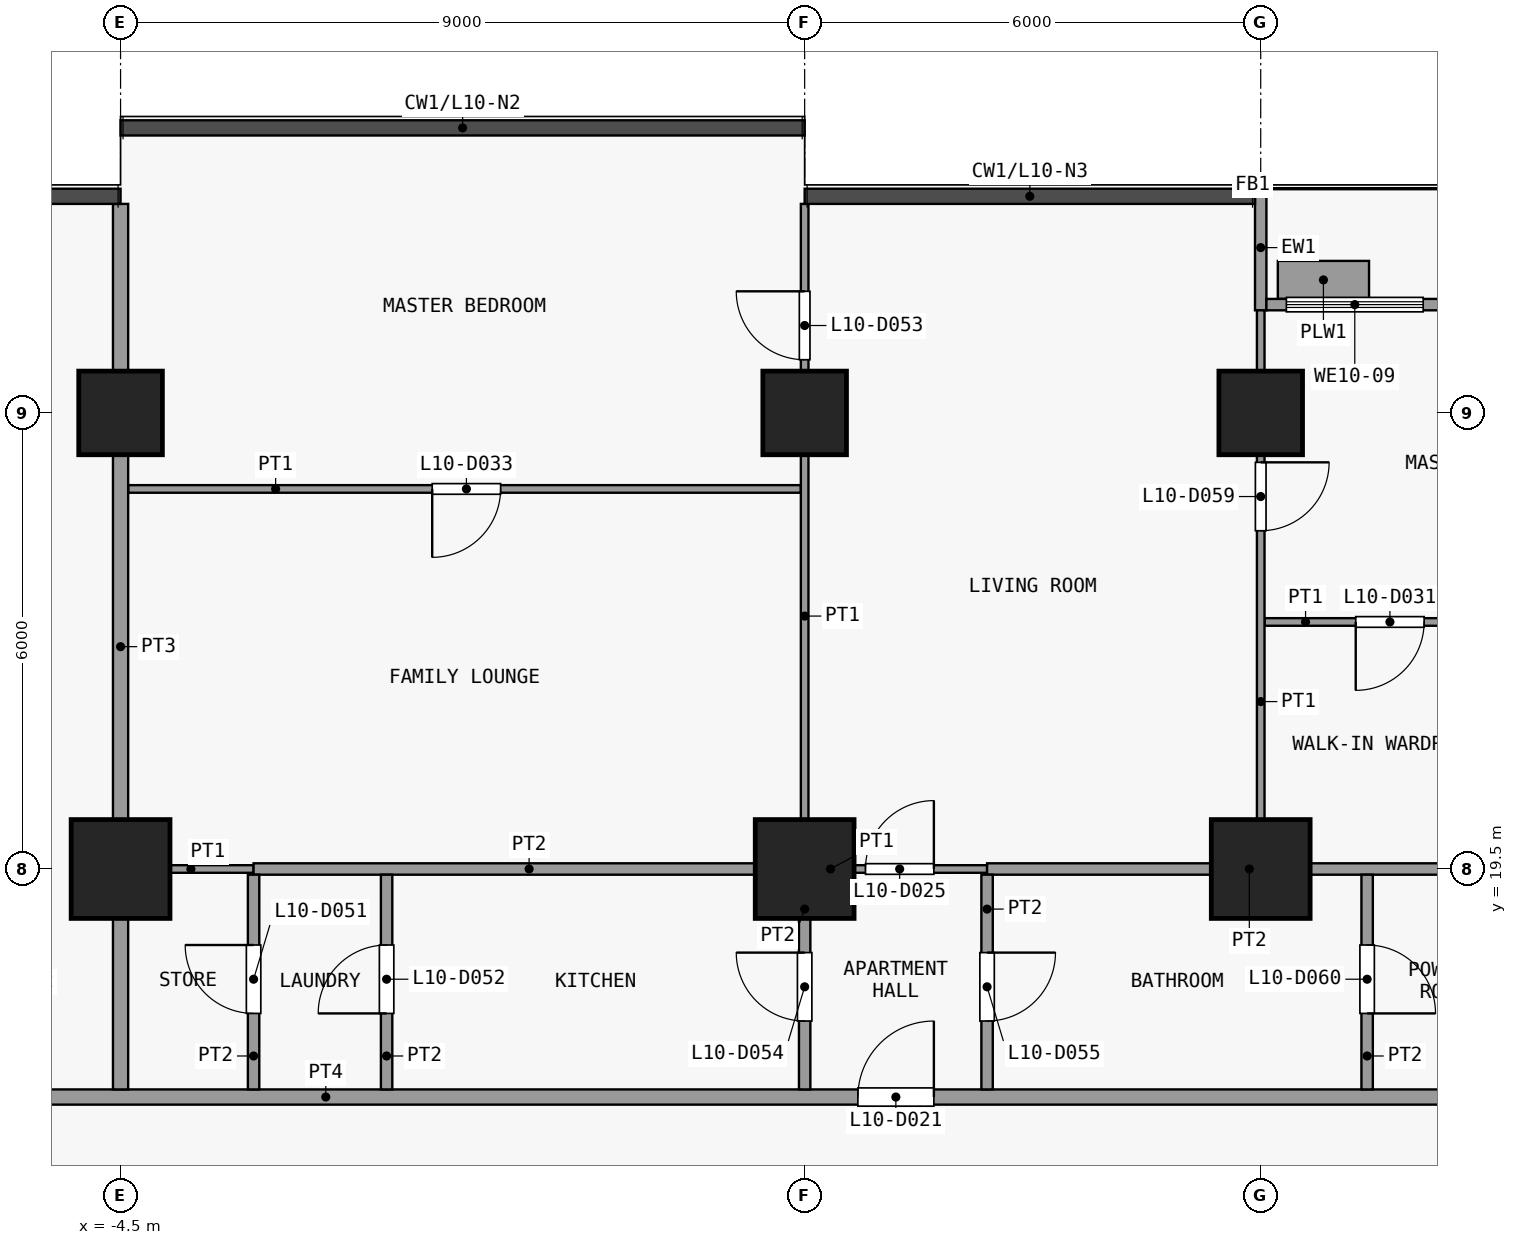
"""IFC4 building model, lengths in metres.
Left out: names, types, materials, properties, quantities, classifications, styles, units other than length and angle.
Written with IfcOpenShell. Run it as: python <this file> out.ifc"""

import sys

from ifc_helpers import new_model, si_unit, direction, frame, frame_2d, origin, origin_2d, place, context, subcontext, project, spatial, rectangle, extrude, element, fill, save


model = new_model("IFC4")
c1 = context("Model", 3, precision=1e-05, world=origin(), true_north=direction((0.0, 1.0)))
c2 = subcontext(c1, "Body", "Model", "MODEL_VIEW")
j1 = project(units=[si_unit("LENGTHUNIT", "METRE"), si_unit("PLANEANGLEUNIT", "RADIAN")], contexts=[c1])
p1 = place(None, origin())
s1 = spatial("IfcSite", under=j1, at=p1, CompositionType="ELEMENT")
p2 = place(p1, origin())
s2 = spatial("IfcBuilding", under=s1, at=p2, CompositionType="ELEMENT")
p3 = place(p2, frame((0.0, 0.0, 46.9)))
s3 = spatial("IfcBuildingStorey", under=s2, at=p3, CompositionType="ELEMENT", Elevation=46.9)
p4 = place(p3, frame((-4.5, 19.5, 0.0), z_axis=(0.0, 0.0, 1.0), x_axis=(1.0, 0.0, 0.0)))
e1 = element("IfcColumn", 1, at=p4, inside=s3, PredefinedType="COLUMN", context=c2, shape_type="SweptSolid", body=[
    extrude(rectangle(XDim=1.3, YDim=1.3, at=origin_2d()), origin(), (0.0, 0.0, 1.0), 3.6),
])
p5 = place(p3, frame((-4.5, 25.5, 0.0), z_axis=(0.0, 0.0, 1.0), x_axis=(1.0, 0.0, 0.0)))
e2 = element("IfcColumn", 2, at=p5, inside=s3, PredefinedType="COLUMN", context=c2, shape_type="SweptSolid", body=[
    extrude(rectangle(XDim=1.1, YDim=1.1, at=origin_2d()), origin(), (0.0, 0.0, 1.0), 3.6),
])
p6 = place(p3, frame((4.5, 19.5, 0.0), z_axis=(0.0, 0.0, 1.0), x_axis=(1.0, 0.0, 0.0)))
e3 = element("IfcColumn", 3, at=p6, inside=s3, PredefinedType="COLUMN", context=c2, shape_type="SweptSolid", body=[
    extrude(rectangle(XDim=1.3, YDim=1.3, at=origin_2d()), origin(), (0.0, 0.0, 1.0), 3.6),
])
p7 = place(p3, frame((4.5, 25.5, 0.0), z_axis=(0.0, 0.0, 1.0), x_axis=(1.0, 0.0, 0.0)))
e4 = element("IfcColumn", 4, at=p7, inside=s3, PredefinedType="COLUMN", context=c2, shape_type="SweptSolid", body=[
    extrude(rectangle(XDim=1.1, YDim=1.1, at=origin_2d()), origin(), (0.0, 0.0, 1.0), 3.6),
])
p8 = place(p3, frame((10.5, 19.5, 0.0), z_axis=(0.0, 0.0, 1.0), x_axis=(1.0, 0.0, 0.0)))
e5 = element("IfcColumn", 5, at=p8, inside=s3, PredefinedType="COLUMN", context=c2, shape_type="SweptSolid", body=[
    extrude(rectangle(XDim=1.3, YDim=1.3, at=origin_2d()), origin(), (0.0, 0.0, 1.0), 3.6),
])
p9 = place(p3, frame((10.5, 25.5, 0.0), z_axis=(0.0, 0.0, 1.0), x_axis=(1.0, 0.0, 0.0)))
e6 = element("IfcColumn", 6, at=p9, inside=s3, PredefinedType="COLUMN", context=c2, shape_type="SweptSolid", body=[
    extrude(rectangle(XDim=1.1, YDim=1.1, at=origin_2d()), origin(), (0.0, 0.0, 1.0), 3.6),
])
p10 = place(p3, frame((10.5, 26.85, 0.0), z_axis=(0.0, 0.0, 1.0), x_axis=(0.0, 1.0, 0.0)))
e7 = element("IfcWall", 7, at=p10, inside=s3, PredefinedType="SOLIDWALL", context=c2, shape_type="SweptSolid", body=[
    extrude(rectangle(XDim=1.65, YDim=0.15, at=frame_2d((0.825, 0.0))), origin(), (0.0, 0.0, 1.0), 3.3),
])
p11 = place(p3, frame((10.575, 26.925, 0.0), z_axis=(0.0, 0.0, 1.0), x_axis=(1.0, 0.0, 0.0)))
e8 = element("IfcWall", 8, at=p11, inside=s3, PredefinedType="SOLIDWALL", context=c2, shape_type="SweptSolid", body=[
    extrude(rectangle(XDim=5.85, YDim=0.15, at=frame_2d((2.925, 0.0))), origin(), (0.0, 0.0, 1.0), 3.3),
])
p12 = place(p11, frame((2.325, 0.0, 0.0)))
e9 = element("IfcOpeningElement", 9, at=p12, cuts=e8, PredefinedType="OPENING", context=c2, shape_type="SweptSolid", body=[
    extrude(rectangle(XDim=1.2, YDim=2.4, at=frame_2d((0.6, 1.2))), frame((0.0, 0.085, 0.0), z_axis=(0.0, -1.0, 0.0), x_axis=(1.0, 0.0, 0.0)), (0.0, 0.0, 1.0), 0.17),
])
p13 = place(p11, frame((0.262, 0.0, 0.9)))
e10 = element("IfcOpeningElement", 10, at=p13, cuts=e8, PredefinedType="OPENING", context=c2, shape_type="SweptSolid", body=[
    extrude(rectangle(XDim=1.8, YDim=2.1, at=frame_2d((0.9, 1.05))), frame((0.0, 0.085, 0.0), z_axis=(0.0, -1.0, 0.0), x_axis=(1.0, 0.0, 0.0)), (0.0, 0.0, 1.0), 0.17),
])
p14 = place(p11, frame((3.788, 0.0, 0.9)))
e11 = element("IfcOpeningElement", 11, at=p14, cuts=e8, PredefinedType="OPENING", context=c2, shape_type="SweptSolid", body=[
    extrude(rectangle(XDim=1.8, YDim=2.1, at=frame_2d((0.9, 1.05))), frame((0.0, 0.085, 0.0), z_axis=(0.0, -1.0, 0.0), x_axis=(1.0, 0.0, 0.0)), (0.0, 0.0, 1.0), 0.17),
])
p15 = place(p3, frame((10.725, 27.25, 0.0), z_axis=(0.0, 0.0, 1.0), x_axis=(1.0, 0.0, 0.0)))
e12 = element("IfcWall", 12, at=p15, inside=s3, PredefinedType="USERDEFINED", context=c2, shape_type="SweptSolid", body=[
    extrude(rectangle(XDim=1.2, YDim=0.5, at=frame_2d((0.6, 0.0))), origin(), (0.0, 0.0, 1.0), 0.9),
])
p16 = place(p3, frame((-25.35, 16.5, 0.0), z_axis=(0.0, 0.0, 1.0), x_axis=(1.0, 0.0, 0.0)))
e13 = element("IfcWall", 13, at=p16, inside=s3, PredefinedType="PARTITIONING", context=c2, shape_type="SweptSolid", body=[
    extrude(rectangle(XDim=50.7, YDim=0.2, at=frame_2d((25.35, 0.0))), origin(), (0.0, 0.0, 1.0), 3.3),
])
p17 = place(p16, frame((7.05, 0.0, 0.0)))
e14 = element("IfcOpeningElement", 14, at=p17, cuts=e13, PredefinedType="OPENING", context=c2, shape_type="SweptSolid", body=[
    extrude(rectangle(XDim=1.0, YDim=2.1, at=frame_2d((0.5, 1.05))), frame((0.0, 0.11, 0.0), z_axis=(0.0, -1.0, 0.0), x_axis=(1.0, 0.0, 0.0)), (0.0, 0.0, 1.0), 0.22),
])
p18 = place(p16, frame((15.55, 0.0, 0.0)))
e15 = element("IfcOpeningElement", 15, at=p18, cuts=e13, PredefinedType="OPENING", context=c2, shape_type="SweptSolid", body=[
    extrude(rectangle(XDim=1.0, YDim=2.1, at=frame_2d((0.5, 1.05))), frame((0.0, 0.11, 0.0), z_axis=(0.0, -1.0, 0.0), x_axis=(1.0, 0.0, 0.0)), (0.0, 0.0, 1.0), 0.22),
])
p19 = place(p16, frame((30.55, 0.0, 0.0)))
e16 = element("IfcOpeningElement", 16, at=p19, cuts=e13, PredefinedType="OPENING", context=c2, shape_type="SweptSolid", body=[
    extrude(rectangle(XDim=1.0, YDim=2.1, at=frame_2d((0.5, 1.05))), frame((0.0, 0.11, 0.0), z_axis=(0.0, -1.0, 0.0), x_axis=(1.0, 0.0, 0.0)), (0.0, 0.0, 1.0), 0.22),
])
p20 = place(p16, frame((45.05, 0.0, 0.0)))
e17 = element("IfcOpeningElement", 17, at=p20, cuts=e13, PredefinedType="OPENING", context=c2, shape_type="SweptSolid", body=[
    extrude(rectangle(XDim=1.0, YDim=2.1, at=frame_2d((0.5, 1.05))), frame((0.0, 0.11, 0.0), z_axis=(0.0, -1.0, 0.0), x_axis=(1.0, 0.0, 0.0)), (0.0, 0.0, 1.0), 0.22),
])
p21 = place(p3, frame((-4.4, 19.5, 0.0), z_axis=(0.0, 0.0, 1.0), x_axis=(1.0, 0.0, 0.0)))
e18 = element("IfcWall", 18, at=p21, inside=s3, PredefinedType="PARTITIONING", context=c2, shape_type="SweptSolid", body=[
    extrude(rectangle(XDim=1.65, YDim=0.1, at=frame_2d((0.825, 0.0))), origin(), (0.0, 0.0, 1.0), 3.3),
])
p22 = place(p3, frame((4.5, 19.5, 0.0), z_axis=(0.0, 0.0, 1.0), x_axis=(1.0, 0.0, 0.0)))
e19 = element("IfcWall", 19, at=p22, inside=s3, PredefinedType="PARTITIONING", context=c2, shape_type="SweptSolid", body=[
    extrude(rectangle(XDim=2.4, YDim=0.1, at=frame_2d((1.2, 0.0))), origin(), (0.0, 0.0, 1.0), 3.3),
])
p23 = place(p22, frame((0.8, 0.0, 0.0)))
e20 = element("IfcOpeningElement", 20, at=p23, cuts=e19, PredefinedType="OPENING", context=c2, shape_type="SweptSolid", body=[
    extrude(rectangle(XDim=0.9, YDim=2.1, at=frame_2d((0.45, 1.05))), frame((0.0, 0.06, 0.0), z_axis=(0.0, -1.0, 0.0), x_axis=(1.0, 0.0, 0.0)), (0.0, 0.0, 1.0), 0.12),
])
p24 = place(p3, frame((-2.75, 19.5, 0.0), z_axis=(0.0, 0.0, 1.0), x_axis=(1.0, 0.0, 0.0)))
e21 = element("IfcWall", 21, at=p24, inside=s3, PredefinedType="PARTITIONING", context=c2, shape_type="SweptSolid", body=[
    extrude(rectangle(XDim=7.25, YDim=0.15, at=frame_2d((3.625, 0.0))), origin(), (0.0, 0.0, 1.0), 3.3),
])
p25 = place(p3, frame((6.9, 19.5, 0.0), z_axis=(0.0, 0.0, 1.0), x_axis=(1.0, 0.0, 0.0)))
e22 = element("IfcWall", 22, at=p25, inside=s3, PredefinedType="PARTITIONING", context=c2, shape_type="SweptSolid", body=[
    extrude(rectangle(XDim=6.9, YDim=0.15, at=frame_2d((3.45, 0.0))), origin(), (0.0, 0.0, 1.0), 3.3),
])
p26 = place(p3, frame((10.55, 22.75, 0.0), z_axis=(0.0, 0.0, 1.0), x_axis=(1.0, 0.0, 0.0)))
e23 = element("IfcWall", 23, at=p26, inside=s3, PredefinedType="PARTITIONING", context=c2, shape_type="SweptSolid", body=[
    extrude(rectangle(XDim=3.25, YDim=0.1, at=frame_2d((1.625, 0.0))), origin(), (0.0, 0.0, 1.0), 3.3),
])
p27 = place(p26, frame((1.2, 0.0, 0.0)))
e24 = element("IfcOpeningElement", 24, at=p27, cuts=e23, PredefinedType="OPENING", context=c2, shape_type="SweptSolid", body=[
    extrude(rectangle(XDim=0.9, YDim=2.1, at=frame_2d((0.45, 1.05))), frame((0.0, 0.06, 0.0), z_axis=(0.0, -1.0, 0.0), x_axis=(1.0, 0.0, 0.0)), (0.0, 0.0, 1.0), 0.12),
])
p28 = place(p3, frame((-4.4, 24.5, 0.0), z_axis=(0.0, 0.0, 1.0), x_axis=(1.0, 0.0, 0.0)))
e25 = element("IfcWall", 25, at=p28, inside=s3, PredefinedType="PARTITIONING", context=c2, shape_type="SweptSolid", body=[
    extrude(rectangle(XDim=8.85, YDim=0.1, at=frame_2d((4.425, 0.0))), origin(), (0.0, 0.0, 1.0), 3.3),
])
p29 = place(p28, frame((4.0, 0.0, 0.0)))
e26 = element("IfcOpeningElement", 26, at=p29, cuts=e25, PredefinedType="OPENING", context=c2, shape_type="SweptSolid", body=[
    extrude(rectangle(XDim=0.9, YDim=2.1, at=frame_2d((0.45, 1.05))), frame((0.0, 0.06, 0.0), z_axis=(0.0, -1.0, 0.0), x_axis=(1.0, 0.0, 0.0)), (0.0, 0.0, 1.0), 0.12),
])
p30 = place(p3, frame((-4.5, 16.6, 0.0), z_axis=(0.0, 0.0, 1.0), x_axis=(0.0, 1.0, 0.0)))
e27 = element("IfcWall", 27, at=p30, inside=s3, PredefinedType="PARTITIONING", context=c2, shape_type="SweptSolid", body=[
    extrude(rectangle(XDim=11.65, YDim=0.2, at=frame_2d((5.825, 0.0))), origin(), (0.0, 0.0, 1.0), 3.3),
])
p31 = place(p3, frame((-2.75, 16.6, 0.0), z_axis=(0.0, 0.0, 1.0), x_axis=(0.0, 1.0, 0.0)))
e28 = element("IfcWall", 28, at=p31, inside=s3, PredefinedType="PARTITIONING", context=c2, shape_type="SweptSolid", body=[
    extrude(rectangle(XDim=2.825, YDim=0.15, at=frame_2d((1.413, 0.0))), origin(), (0.0, 0.0, 1.0), 3.3),
])
p32 = place(p31, frame((1.0, 0.0, 0.0)))
e29 = element("IfcOpeningElement", 29, at=p32, cuts=e28, PredefinedType="OPENING", context=c2, shape_type="SweptSolid", body=[
    extrude(rectangle(XDim=0.9, YDim=2.1, at=frame_2d((0.45, 1.05))), frame((0.0, 0.085, 0.0), z_axis=(0.0, -1.0, 0.0), x_axis=(1.0, 0.0, 0.0)), (0.0, 0.0, 1.0), 0.17),
])
p33 = place(p3, frame((-1.0, 16.6, 0.0), z_axis=(0.0, 0.0, 1.0), x_axis=(0.0, 1.0, 0.0)))
e30 = element("IfcWall", 30, at=p33, inside=s3, PredefinedType="PARTITIONING", context=c2, shape_type="SweptSolid", body=[
    extrude(rectangle(XDim=2.825, YDim=0.15, at=frame_2d((1.413, 0.0))), origin(), (0.0, 0.0, 1.0), 3.3),
])
p34 = place(p33, frame((1.0, 0.0, 0.0)))
e31 = element("IfcOpeningElement", 31, at=p34, cuts=e30, PredefinedType="OPENING", context=c2, shape_type="SweptSolid", body=[
    extrude(rectangle(XDim=0.9, YDim=2.1, at=frame_2d((0.45, 1.05))), frame((0.0, 0.085, 0.0), z_axis=(0.0, -1.0, 0.0), x_axis=(1.0, 0.0, 0.0)), (0.0, 0.0, 1.0), 0.17),
])
p35 = place(p3, frame((4.5, 19.575, 0.0), z_axis=(0.0, 0.0, 1.0), x_axis=(0.0, 1.0, 0.0)))
e32 = element("IfcWall", 32, at=p35, inside=s3, PredefinedType="PARTITIONING", context=c2, shape_type="SweptSolid", body=[
    extrude(rectangle(XDim=8.675, YDim=0.1, at=frame_2d((4.337, 0.0))), origin(), (0.0, 0.0, 1.0), 3.3),
])
p36 = place(p35, frame((6.625, 0.0, 0.0)))
e33 = element("IfcOpeningElement", 33, at=p36, cuts=e32, PredefinedType="OPENING", context=c2, shape_type="SweptSolid", body=[
    extrude(rectangle(XDim=0.9, YDim=2.1, at=frame_2d((0.45, 1.05))), frame((0.0, 0.06, 0.0), z_axis=(0.0, -1.0, 0.0), x_axis=(1.0, 0.0, 0.0)), (0.0, 0.0, 1.0), 0.12),
])
p37 = place(p3, frame((4.5, 16.6, 0.0), z_axis=(0.0, 0.0, 1.0), x_axis=(0.0, 1.0, 0.0)))
e34 = element("IfcWall", 34, at=p37, inside=s3, PredefinedType="PARTITIONING", context=c2, shape_type="SweptSolid", body=[
    extrude(rectangle(XDim=2.825, YDim=0.15, at=frame_2d((1.413, 0.0))), origin(), (0.0, 0.0, 1.0), 3.3),
])
p38 = place(p37, frame((0.9, 0.0, 0.0)))
e35 = element("IfcOpeningElement", 35, at=p38, cuts=e34, PredefinedType="OPENING", context=c2, shape_type="SweptSolid", body=[
    extrude(rectangle(XDim=0.9, YDim=2.1, at=frame_2d((0.45, 1.05))), frame((0.0, 0.085, 0.0), z_axis=(0.0, -1.0, 0.0), x_axis=(1.0, 0.0, 0.0)), (0.0, 0.0, 1.0), 0.17),
])
p39 = place(p3, frame((6.9, 16.6, 0.0), z_axis=(0.0, 0.0, 1.0), x_axis=(0.0, 1.0, 0.0)))
e36 = element("IfcWall", 36, at=p39, inside=s3, PredefinedType="PARTITIONING", context=c2, shape_type="SweptSolid", body=[
    extrude(rectangle(XDim=2.825, YDim=0.15, at=frame_2d((1.413, 0.0))), origin(), (0.0, 0.0, 1.0), 3.3),
])
p40 = place(p39, frame((0.9, 0.0, 0.0)))
e37 = element("IfcOpeningElement", 37, at=p40, cuts=e36, PredefinedType="OPENING", context=c2, shape_type="SweptSolid", body=[
    extrude(rectangle(XDim=0.9, YDim=2.1, at=frame_2d((0.45, 1.05))), frame((0.0, 0.085, 0.0), z_axis=(0.0, -1.0, 0.0), x_axis=(1.0, 0.0, 0.0)), (0.0, 0.0, 1.0), 0.17),
])
p41 = place(p3, frame((10.5, 19.575, 0.0), z_axis=(0.0, 0.0, 1.0), x_axis=(0.0, 1.0, 0.0)))
e38 = element("IfcWall", 38, at=p41, inside=s3, PredefinedType="PARTITIONING", context=c2, shape_type="SweptSolid", body=[
    extrude(rectangle(XDim=7.275, YDim=0.1, at=frame_2d((3.638, 0.0))), origin(), (0.0, 0.0, 1.0), 3.3),
])
p42 = place(p41, frame((4.375, 0.0, 0.0)))
e39 = element("IfcOpeningElement", 39, at=p42, cuts=e38, PredefinedType="OPENING", context=c2, shape_type="SweptSolid", body=[
    extrude(rectangle(XDim=0.9, YDim=2.1, at=frame_2d((0.45, 1.05))), frame((0.0, 0.06, 0.0), z_axis=(0.0, -1.0, 0.0), x_axis=(1.0, 0.0, 0.0)), (0.0, 0.0, 1.0), 0.12),
])
p43 = place(p3, frame((11.9, 16.6, 0.0), z_axis=(0.0, 0.0, 1.0), x_axis=(0.0, 1.0, 0.0)))
e40 = element("IfcWall", 40, at=p43, inside=s3, PredefinedType="PARTITIONING", context=c2, shape_type="SweptSolid", body=[
    extrude(rectangle(XDim=2.825, YDim=0.15, at=frame_2d((1.413, 0.0))), origin(), (0.0, 0.0, 1.0), 3.3),
])
p44 = place(p43, frame((1.0, 0.0, 0.0)))
e41 = element("IfcOpeningElement", 41, at=p44, cuts=e40, PredefinedType="OPENING", context=c2, shape_type="SweptSolid", body=[
    extrude(rectangle(XDim=0.9, YDim=2.1, at=frame_2d((0.45, 1.05))), frame((0.0, 0.085, 0.0), z_axis=(0.0, -1.0, 0.0), x_axis=(1.0, 0.0, 0.0)), (0.0, 0.0, 1.0), 0.17),
])
p45 = place(p13, origin())
e42 = element("IfcWindow", 42, at=p45, inside=s3, PartitioningType="SINGLE_PANEL", PredefinedType="WINDOW", context=c2, shape_type="SweptSolid", body=[
    extrude(rectangle(XDim=1.8, YDim=2.1, at=frame_2d((0.9, 1.05))), frame((0.0, 0.03, 0.0), z_axis=(0.0, -1.0, 0.0), x_axis=(1.0, 0.0, 0.0)), (0.0, 0.0, 1.0), 0.06),
])
fill(e10, e42)
p46 = place(p19, origin())
e43 = element("IfcDoor", 43, at=p46, inside=s3, OperationType="SINGLE_SWING_LEFT", PredefinedType="DOOR", context=c2, shape_type="SweptSolid", body=[
    extrude(rectangle(XDim=1.0, YDim=2.1, at=frame_2d((0.5, 1.05))), frame((0.0, 0.025, 0.0), z_axis=(0.0, -1.0, 0.0), x_axis=(1.0, 0.0, 0.0)), (0.0, 0.0, 1.0), 0.05),
])
fill(e16, e43)
p47 = place(p23, origin())
e44 = element("IfcDoor", 44, at=p47, inside=s3, OperationType="SINGLE_SWING_LEFT", PredefinedType="DOOR", context=c2, shape_type="SweptSolid", body=[
    extrude(rectangle(XDim=0.9, YDim=2.1, at=frame_2d((0.45, 1.05))), frame((0.0, 0.025, 0.0), z_axis=(0.0, -1.0, 0.0), x_axis=(1.0, 0.0, 0.0)), (0.0, 0.0, 1.0), 0.05),
])
fill(e20, e44)
p48 = place(p27, origin())
e45 = element("IfcDoor", 45, at=p48, inside=s3, OperationType="SINGLE_SWING_LEFT", PredefinedType="DOOR", context=c2, shape_type="SweptSolid", body=[
    extrude(rectangle(XDim=0.9, YDim=2.1, at=frame_2d((0.45, 1.05))), frame((0.0, 0.025, 0.0), z_axis=(0.0, -1.0, 0.0), x_axis=(1.0, 0.0, 0.0)), (0.0, 0.0, 1.0), 0.05),
])
fill(e24, e45)
p49 = place(p29, origin())
e46 = element("IfcDoor", 46, at=p49, inside=s3, OperationType="SINGLE_SWING_LEFT", PredefinedType="DOOR", context=c2, shape_type="SweptSolid", body=[
    extrude(rectangle(XDim=0.9, YDim=2.1, at=frame_2d((0.45, 1.05))), frame((0.0, 0.025, 0.0), z_axis=(0.0, -1.0, 0.0), x_axis=(1.0, 0.0, 0.0)), (0.0, 0.0, 1.0), 0.05),
])
fill(e26, e46)
p50 = place(p32, origin())
e47 = element("IfcDoor", 47, at=p50, inside=s3, OperationType="SINGLE_SWING_LEFT", PredefinedType="DOOR", context=c2, shape_type="SweptSolid", body=[
    extrude(rectangle(XDim=0.9, YDim=2.1, at=frame_2d((0.45, 1.05))), frame((0.0, 0.025, 0.0), z_axis=(0.0, -1.0, 0.0), x_axis=(1.0, 0.0, 0.0)), (0.0, 0.0, 1.0), 0.05),
])
fill(e29, e47)
p51 = place(p34, origin())
e48 = element("IfcDoor", 48, at=p51, inside=s3, OperationType="SINGLE_SWING_RIGHT", PredefinedType="DOOR", context=c2, shape_type="SweptSolid", body=[
    extrude(rectangle(XDim=0.9, YDim=2.1, at=frame_2d((0.45, 1.05))), frame((0.0, 0.025, 0.0), z_axis=(0.0, -1.0, 0.0), x_axis=(1.0, 0.0, 0.0)), (0.0, 0.0, 1.0), 0.05),
])
fill(e31, e48)
p52 = place(p36, origin())
e49 = element("IfcDoor", 49, at=p52, inside=s3, OperationType="SINGLE_SWING_LEFT", PredefinedType="DOOR", context=c2, shape_type="SweptSolid", body=[
    extrude(rectangle(XDim=0.9, YDim=2.1, at=frame_2d((0.45, 1.05))), frame((0.0, 0.025, 0.0), z_axis=(0.0, -1.0, 0.0), x_axis=(1.0, 0.0, 0.0)), (0.0, 0.0, 1.0), 0.05),
])
fill(e33, e49)
p53 = place(p38, origin())
e50 = element("IfcDoor", 50, at=p53, inside=s3, OperationType="SINGLE_SWING_LEFT", PredefinedType="DOOR", context=c2, shape_type="SweptSolid", body=[
    extrude(rectangle(XDim=0.9, YDim=2.1, at=frame_2d((0.45, 1.05))), frame((0.0, 0.025, 0.0), z_axis=(0.0, -1.0, 0.0), x_axis=(1.0, 0.0, 0.0)), (0.0, 0.0, 1.0), 0.05),
])
fill(e35, e50)
p54 = place(p40, origin())
e51 = element("IfcDoor", 51, at=p54, inside=s3, OperationType="SINGLE_SWING_RIGHT", PredefinedType="DOOR", context=c2, shape_type="SweptSolid", body=[
    extrude(rectangle(XDim=0.9, YDim=2.1, at=frame_2d((0.45, 1.05))), frame((0.0, 0.025, 0.0), z_axis=(0.0, -1.0, 0.0), x_axis=(1.0, 0.0, 0.0)), (0.0, 0.0, 1.0), 0.05),
])
fill(e37, e51)
p55 = place(p42, origin())
e52 = element("IfcDoor", 52, at=p55, inside=s3, OperationType="SINGLE_SWING_RIGHT", PredefinedType="DOOR", context=c2, shape_type="SweptSolid", body=[
    extrude(rectangle(XDim=0.9, YDim=2.1, at=frame_2d((0.45, 1.05))), frame((0.0, 0.025, 0.0), z_axis=(0.0, -1.0, 0.0), x_axis=(1.0, 0.0, 0.0)), (0.0, 0.0, 1.0), 0.05),
])
fill(e39, e52)
p56 = place(p44, origin())
e53 = element("IfcDoor", 53, at=p56, inside=s3, OperationType="SINGLE_SWING_LEFT", PredefinedType="DOOR", context=c2, shape_type="SweptSolid", body=[
    extrude(rectangle(XDim=0.9, YDim=2.1, at=frame_2d((0.45, 1.05))), frame((0.0, 0.025, 0.0), z_axis=(0.0, -1.0, 0.0), x_axis=(1.0, 0.0, 0.0)), (0.0, 0.0, 1.0), 0.05),
])
fill(e41, e53)
save(model, sys.argv[1])
